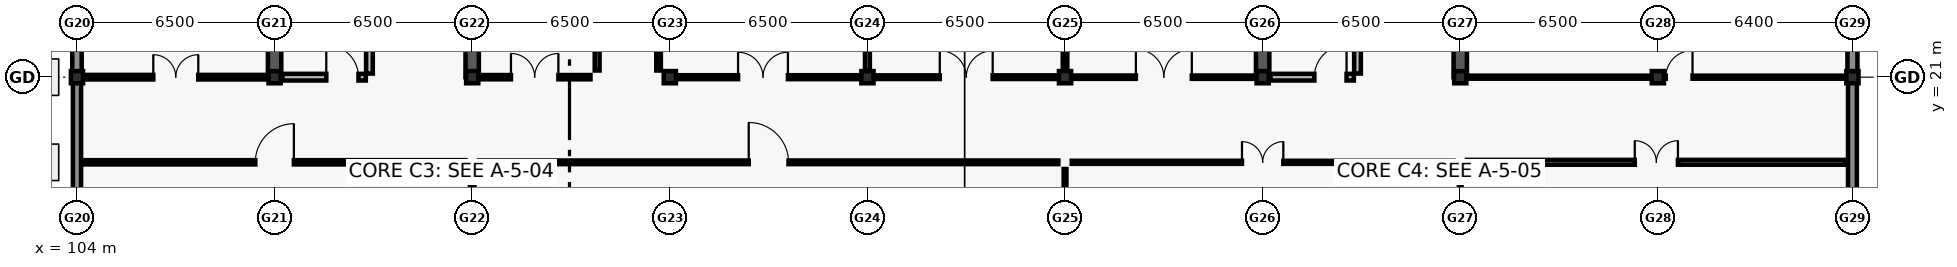
"""IFC4 building model, lengths in metres.
Left out: names, types, materials, properties, quantities, classifications, styles, units other than length and angle.
Written with IfcOpenShell. Run it as: python <this file> out.ifc"""

import sys

from ifc_helpers import new_model, si_unit, direction, frame, frame_2d, origin, origin_2d, place, context, subcontext, project, spatial, rectangle, i_section, extrude, element, fill, save


model = new_model("IFC4")
c1 = context("Model", 3, precision=1e-05, world=origin(), true_north=direction((0.0, 1.0)))
c2 = subcontext(c1, "Body", "Model", "MODEL_VIEW")
j1 = project(units=[si_unit("LENGTHUNIT", "METRE"), si_unit("PLANEANGLEUNIT", "RADIAN")], contexts=[c1])
p1 = place(None, origin())
s1 = spatial("IfcSite", under=j1, at=p1, CompositionType="ELEMENT")
p2 = place(p1, origin())
s2 = spatial("IfcBuilding", under=s1, at=p2, CompositionType="ELEMENT")
p3 = place(p2, origin())
s3 = spatial("IfcBuildingStorey", under=s2, at=p3, CompositionType="ELEMENT", Elevation=0.0)
for number, where, z_axis, x_axis in (
    (1, (104.0, 21.0, 0.0), (0.0, 0.0, 1.0), (1.0, 0.0, 0.0)),
    (2, (110.5, 21.0, 0.0), (0.0, 0.0, 1.0), (1.0, 0.0, 0.0)),
    (3, (117.0, 21.0, 0.0), (0.0, 0.0, 1.0), (1.0, 0.0, 0.0)),
    (4, (123.5, 21.0, 0.0), (0.0, 0.0, 1.0), (1.0, 0.0, 0.0)),
    (5, (130.0, 21.0, 0.0), (0.0, 0.0, 1.0), (1.0, 0.0, 0.0)),
    (6, (136.5, 21.0, 0.0), (0.0, 0.0, 1.0), (1.0, 0.0, 0.0)),
    (7, (143.0, 21.0, 0.0), (0.0, 0.0, 1.0), (1.0, 0.0, 0.0)),
    (8, (149.5, 21.0, 0.0), (0.0, 0.0, 1.0), (1.0, 0.0, 0.0)),
    (9, (156.0, 21.0, 0.0), (0.0, 0.0, 1.0), (1.0, 0.0, 0.0)),
    (10, (162.4, 21.0, 0.0), (0.0, 0.0, 1.0), (1.0, 0.0, 0.0)),
):
    element("IfcColumn", number, at=place(p3, frame(where, z_axis=z_axis, x_axis=x_axis)), inside=s3, PredefinedType="COLUMN", context=c2, shape_type="SweptSolid", body=[
        extrude(i_section(OverallWidth=0.4, OverallDepth=0.4, WebThickness=0.02, FlangeThickness=0.032, at=origin_2d()), origin(), (0.0, 0.0, 1.0), 5.4),
    ])
for number, where, z_axis, x_axis in (
    (11, (110.5, 21.0, 0.0), (0.0, 0.0, 1.0), (0.0, 1.0, 0.0)),
    (12, (117.0, 21.0, 0.0), (0.0, 0.0, 1.0), (0.0, 1.0, 0.0)),
    (13, (143.0, 21.0, 0.0), (0.0, 0.0, 1.0), (0.0, 1.0, 0.0)),
    (14, (149.5, 21.0, 0.0), (0.0, 0.0, 1.0), (0.0, 1.0, 0.0)),
):
    element("IfcWall", number, at=place(p3, frame(where, z_axis=z_axis, x_axis=x_axis)), inside=s3, PredefinedType="SHEAR", context=c2, shape_type="SweptSolid", body=[
        extrude(rectangle(XDim=6.38, YDim=0.44, at=frame_2d((3.19, 0.0))), origin(), (0.0, 0.0, 1.0), 5.16),
    ])
p4 = place(p3, frame((104.0, 14.405, 0.0), z_axis=(0.0, 0.0, 1.0), x_axis=(0.0, 1.0, 0.0)))
e15 = element("IfcWall", 15, at=p4, inside=s3, PredefinedType="SOLIDWALL", context=c2, shape_type="SweptSolid", body=[
    extrude(rectangle(XDim=6.59, YDim=0.27, at=frame_2d((3.295, 0.0))), origin(), (0.0, 0.0, 1.0), 4.52),
])
p5 = place(p4, frame((1.288, 0.0, 0.8)))
e16 = element("IfcOpeningElement", 16, at=p5, cuts=e15, PredefinedType="OPENING", context=c2, shape_type="SweptSolid", body=[
    extrude(rectangle(XDim=1.25, YDim=1.65, at=frame_2d((0.625, 0.825))), frame((0.0, 0.145, 0.0), z_axis=(0.0, -1.0, 0.0), x_axis=(1.0, 0.0, 0.0)), (0.0, 0.0, 1.0), 0.29),
])
p6 = place(p3, frame((162.4, 20.995, 0.0), z_axis=(0.0, 0.0, 1.0), x_axis=(0.0, -1.0, 0.0)))
e17 = element("IfcWall", 17, at=p6, inside=s3, PredefinedType="SOLIDWALL", context=c2, shape_type="SweptSolid", body=[
    extrude(rectangle(XDim=6.59, YDim=0.29, at=frame_2d((3.295, 0.0))), origin(), (0.0, 0.0, 1.0), 4.52),
])
p7 = place(p6, frame((3.978, 0.0, 0.8)))
e18 = element("IfcOpeningElement", 18, at=p7, cuts=e17, PredefinedType="OPENING", context=c2, shape_type="SweptSolid", body=[
    extrude(rectangle(XDim=1.4, YDim=1.65, at=frame_2d((0.7, 0.825))), frame((0.0, 0.155, 0.0), z_axis=(0.0, -1.0, 0.0), x_axis=(1.0, 0.0, 0.0)), (0.0, 0.0, 1.0), 0.31),
])
p8 = place(p3, frame((104.0, 21.005, 0.0), z_axis=(0.0, 0.0, 1.0), x_axis=(0.0, 1.0, 0.0)))
e19 = element("IfcWall", 19, at=p8, inside=s3, PredefinedType="SOLIDWALL", context=c2, shape_type="SweptSolid", body=[
    extrude(rectangle(XDim=6.59, YDim=0.31, at=frame_2d((3.295, 0.0))), origin(), (0.0, 0.0, 1.0), 4.52),
])
p9 = place(p8, frame((2.52, 0.0, 0.8)))
e20 = element("IfcOpeningElement", 20, at=p9, cuts=e19, PredefinedType="OPENING", context=c2, shape_type="SweptSolid", body=[
    extrude(rectangle(XDim=1.55, YDim=1.65, at=frame_2d((0.775, 0.825))), frame((0.0, 0.165, 0.0), z_axis=(0.0, -1.0, 0.0), x_axis=(1.0, 0.0, 0.0)), (0.0, 0.0, 1.0), 0.33),
])
p10 = place(p3, frame((162.4, 27.595, 0.0), z_axis=(0.0, 0.0, 1.0), x_axis=(0.0, -1.0, 0.0)))
e21 = element("IfcWall", 21, at=p10, inside=s3, PredefinedType="SOLIDWALL", context=c2, shape_type="SweptSolid", body=[
    extrude(rectangle(XDim=6.59, YDim=0.33, at=frame_2d((3.295, 0.0))), origin(), (0.0, 0.0, 1.0), 4.52),
])
p11 = place(p10, frame((2.37, 0.0, 0.8)))
e22 = element("IfcOpeningElement", 22, at=p11, cuts=e21, PredefinedType="OPENING", context=c2, shape_type="SweptSolid", body=[
    extrude(rectangle(XDim=1.85, YDim=1.55, at=frame_2d((0.925, 0.775))), frame((0.0, 0.175, 0.0), z_axis=(0.0, -1.0, 0.0), x_axis=(1.0, 0.0, 0.0)), (0.0, 0.0, 1.0), 0.35),
])
p12 = place(p3, frame((113.62, 21.12, 0.0), z_axis=(0.0, 0.0, 1.0), x_axis=(0.0, 1.0, 0.0)))
e23 = element("IfcWall", 23, at=p12, inside=s3, PredefinedType="SOLIDWALL", context=c2, shape_type="SweptSolid", body=[
    extrude(rectangle(XDim=6.255, YDim=0.22, at=frame_2d((3.127, 0.0))), origin(), (0.0, 0.0, 1.0), 5.16),
])
p13 = place(p3, frame((110.76, 21.0, 0.0), z_axis=(0.0, 0.0, 1.0), x_axis=(1.0, 0.0, 0.0)))
e24 = element("IfcWall", 24, at=p13, inside=s3, PredefinedType="SOLIDWALL", context=c2, shape_type="SweptSolid", body=[
    extrude(rectangle(XDim=2.74, YDim=0.22, at=frame_2d((1.37, 0.0))), origin(), (0.0, 0.0, 1.0), 4.52),
])
p14 = place(p13, frame((1.44, 0.0, 0.0)))
e25 = element("IfcOpeningElement", 25, at=p14, cuts=e24, PredefinedType="OPENING", context=c2, shape_type="SweptSolid", body=[
    extrude(rectangle(XDim=1.06, YDim=2.1, at=frame_2d((0.53, 1.05))), frame((0.0, 0.12, 0.0), z_axis=(0.0, -1.0, 0.0), x_axis=(1.0, 0.0, 0.0)), (0.0, 0.0, 1.0), 0.24),
])
p15 = place(p3, frame((146.12, 21.12, 0.0), z_axis=(0.0, 0.0, 1.0), x_axis=(0.0, 1.0, 0.0)))
e26 = element("IfcWall", 26, at=p15, inside=s3, PredefinedType="SOLIDWALL", context=c2, shape_type="SweptSolid", body=[
    extrude(rectangle(XDim=6.255, YDim=0.22, at=frame_2d((3.127, 0.0))), origin(), (0.0, 0.0, 1.0), 5.16),
])
p16 = place(p3, frame((143.26, 21.0, 0.0), z_axis=(0.0, 0.0, 1.0), x_axis=(1.0, 0.0, 0.0)))
e27 = element("IfcWall", 27, at=p16, inside=s3, PredefinedType="SOLIDWALL", context=c2, shape_type="SweptSolid", body=[
    extrude(rectangle(XDim=2.74, YDim=0.22, at=frame_2d((1.37, 0.0))), origin(), (0.0, 0.0, 1.0), 4.52),
])
p17 = place(p16, frame((1.44, 0.0, 0.0)))
e28 = element("IfcOpeningElement", 28, at=p17, cuts=e27, PredefinedType="OPENING", context=c2, shape_type="SweptSolid", body=[
    extrude(rectangle(XDim=1.06, YDim=2.1, at=frame_2d((0.53, 1.05))), frame((0.0, 0.12, 0.0), z_axis=(0.0, -1.0, 0.0), x_axis=(1.0, 0.0, 0.0)), (0.0, 0.0, 1.0), 0.24),
])
p18 = place(p3, frame((121.11, 21.22, 0.0), z_axis=(0.0, 0.0, 1.0), x_axis=(0.0, 1.0, 0.0)))
e29 = element("IfcWall", 29, at=p18, inside=s3, PredefinedType="PARTITIONING", context=c2, shape_type="SweptSolid", body=[
    extrude(rectangle(XDim=2.76, YDim=0.16, at=frame_2d((1.38, 0.0))), origin(), (0.0, 0.0, 1.0), 4.5),
])
p19 = place(p18, frame((0.94, 0.0, 0.0)))
e30 = element("IfcOpeningElement", 30, at=p19, cuts=e29, PredefinedType="OPENING", context=c2, shape_type="SweptSolid", body=[
    extrude(rectangle(XDim=0.88, YDim=2.04, at=frame_2d((0.44, 1.02))), frame((0.0, 0.09, 0.0), z_axis=(0.0, -1.0, 0.0), x_axis=(1.0, 0.0, 0.0)), (0.0, 0.0, 1.0), 0.18),
])
p20 = place(p3, frame((123.13, 21.22, 0.0), z_axis=(0.0, 0.0, 1.0), x_axis=(0.0, 1.0, 0.0)))
e31 = element("IfcWall", 31, at=p20, inside=s3, PredefinedType="PARTITIONING", context=c2, shape_type="SweptSolid", body=[
    extrude(rectangle(XDim=2.76, YDim=0.15, at=frame_2d((1.38, 0.0))), origin(), (0.0, 0.0, 1.0), 4.5),
])
p21 = place(p20, frame((0.925, 0.0, 0.0)))
e32 = element("IfcOpeningElement", 32, at=p21, cuts=e31, PredefinedType="OPENING", context=c2, shape_type="SweptSolid", body=[
    extrude(rectangle(XDim=0.91, YDim=2.06, at=frame_2d((0.455, 1.03))), frame((0.0, 0.085, 0.0), z_axis=(0.0, -1.0, 0.0), x_axis=(1.0, 0.0, 0.0)), (0.0, 0.0, 1.0), 0.17),
])
p22 = place(p3, frame((117.0, 8.02, 0.0), z_axis=(0.0, 0.0, 1.0), x_axis=(0.0, 1.0, 0.0)))
e33 = element("IfcWall", 33, at=p22, inside=s3, PredefinedType="PARTITIONING", context=c2, shape_type="SweptSolid", body=[
    extrude(rectangle(XDim=9.96, YDim=0.15, at=frame_2d((4.98, 0.0))), origin(), (0.0, 0.0, 1.0), 4.5),
])
p23 = place(p3, frame((104.22, 18.2, 0.0), z_axis=(0.0, 0.0, 1.0), x_axis=(1.0, 0.0, 0.0)))
e34 = element("IfcWall", 34, at=p23, inside=s3, PredefinedType="PARTITIONING", context=c2, shape_type="SweptSolid", body=[
    extrude(rectangle(XDim=12.56, YDim=0.14, at=frame_2d((6.28, 0.0))), origin(), (0.0, 0.0, 1.0), 4.5),
])
p24 = place(p23, frame((5.645, 0.0, 0.0)))
e35 = element("IfcOpeningElement", 35, at=p24, cuts=e34, PredefinedType="OPENING", context=c2, shape_type="SweptSolid", body=[
    extrude(rectangle(XDim=1.27, YDim=2.1, at=frame_2d((0.635, 1.05))), frame((0.0, 0.08, 0.0), z_axis=(0.0, -1.0, 0.0), x_axis=(1.0, 0.0, 0.0)), (0.0, 0.0, 1.0), 0.16),
])
p25 = place(p3, frame((136.5, 8.02, 0.0), z_axis=(0.0, 0.0, 1.0), x_axis=(0.0, 1.0, 0.0)))
e36 = element("IfcWall", 36, at=p25, inside=s3, PredefinedType="MOVABLE", context=c2, shape_type="SweptSolid", body=[
    extrude(rectangle(XDim=9.96, YDim=0.09, at=frame_2d((4.98, 0.0))), origin(), (0.0, 0.0, 1.0), 4.5),
])
p26 = place(p3, frame((117.22, 18.2, 0.0), z_axis=(0.0, 0.0, 1.0), x_axis=(1.0, 0.0, 0.0)))
e37 = element("IfcWall", 37, at=p26, inside=s3, PredefinedType="PARTITIONING", context=c2, shape_type="SweptSolid", body=[
    extrude(rectangle(XDim=19.06, YDim=0.12, at=frame_2d((9.53, 0.0))), origin(), (0.0, 0.0, 1.0), 4.5),
])
p27 = place(p26, frame((8.875, 0.0, 0.0)))
e38 = element("IfcOpeningElement", 38, at=p27, cuts=e37, PredefinedType="OPENING", context=c2, shape_type="SweptSolid", body=[
    extrude(rectangle(XDim=1.31, YDim=2.14, at=frame_2d((0.655, 1.07))), frame((0.0, 0.07, 0.0), z_axis=(0.0, -1.0, 0.0), x_axis=(1.0, 0.0, 0.0)), (0.0, 0.0, 1.0), 0.14),
])
p28 = place(p3, frame((149.5, 8.02, 0.0), z_axis=(0.0, 0.0, 1.0), x_axis=(0.0, 1.0, 0.0)))
e39 = element("IfcWall", 39, at=p28, inside=s3, PredefinedType="MOVABLE", context=c2, shape_type="SweptSolid", body=[
    extrude(rectangle(XDim=9.96, YDim=0.09, at=frame_2d((4.98, 0.0))), origin(), (0.0, 0.0, 1.0), 4.5),
])
p29 = place(p3, frame((136.72, 18.2, 0.0), z_axis=(0.0, 0.0, 1.0), x_axis=(1.0, 0.0, 0.0)))
e40 = element("IfcWall", 40, at=p29, inside=s3, PredefinedType="PARTITIONING", context=c2, shape_type="SweptSolid", body=[
    extrude(rectangle(XDim=12.56, YDim=0.1, at=frame_2d((6.28, 0.0))), origin(), (0.0, 0.0, 1.0), 4.5),
])
p30 = place(p29, frame((5.6, 0.0, 0.0)))
e41 = element("IfcOpeningElement", 41, at=p30, cuts=e40, PredefinedType="OPENING", context=c2, shape_type="SweptSolid", body=[
    extrude(rectangle(XDim=1.36, YDim=2.15, at=frame_2d((0.68, 1.075))), frame((0.0, 0.06, 0.0), z_axis=(0.0, -1.0, 0.0), x_axis=(1.0, 0.0, 0.0)), (0.0, 0.0, 1.0), 0.12),
])
p31 = place(p3, frame((149.72, 18.2, 0.0), z_axis=(0.0, 0.0, 1.0), x_axis=(1.0, 0.0, 0.0)))
e42 = element("IfcWall", 42, at=p31, inside=s3, PredefinedType="PARTITIONING", context=c2, shape_type="SweptSolid", body=[
    extrude(rectangle(XDim=12.46, YDim=0.16, at=frame_2d((6.23, 0.0))), origin(), (0.0, 0.0, 1.0), 4.5),
])
p32 = place(p31, frame((5.52, 0.0, 0.0)))
e43 = element("IfcOpeningElement", 43, at=p32, cuts=e42, PredefinedType="OPENING", context=c2, shape_type="SweptSolid", body=[
    extrude(rectangle(XDim=1.42, YDim=2.15, at=frame_2d((0.71, 1.075))), frame((0.0, 0.09, 0.0), z_axis=(0.0, -1.0, 0.0), x_axis=(1.0, 0.0, 0.0)), (0.0, 0.0, 1.0), 0.18),
])
p33 = place(p3, frame((104.22, 21.0, 0.0), z_axis=(0.0, 0.0, 1.0), x_axis=(1.0, 0.0, 0.0)))
e44 = element("IfcWall", 44, at=p33, inside=s3, PredefinedType="PARTITIONING", context=c2, shape_type="SweptSolid", body=[
    extrude(rectangle(XDim=6.06, YDim=0.15, at=frame_2d((3.03, 0.0))), origin(), (0.0, 0.0, 1.0), 4.5),
])
p34 = place(p33, frame((2.29, 0.0, 0.0)))
e45 = element("IfcOpeningElement", 45, at=p34, cuts=e44, PredefinedType="OPENING", context=c2, shape_type="SweptSolid", body=[
    extrude(rectangle(XDim=1.48, YDim=2.18, at=frame_2d((0.74, 1.09))), frame((0.0, 0.085, 0.0), z_axis=(0.0, -1.0, 0.0), x_axis=(1.0, 0.0, 0.0)), (0.0, 0.0, 1.0), 0.17),
])
p35 = place(p3, frame((117.22, 21.0, 0.0), z_axis=(0.0, 0.0, 1.0), x_axis=(1.0, 0.0, 0.0)))
e46 = element("IfcWall", 46, at=p35, inside=s3, PredefinedType="PARTITIONING", context=c2, shape_type="SweptSolid", body=[
    extrude(rectangle(XDim=3.67, YDim=0.14, at=frame_2d((1.835, 0.0))), origin(), (0.0, 0.0, 1.0), 4.5),
])
p36 = place(p35, frame((1.055, 0.0, 0.0)))
e47 = element("IfcOpeningElement", 47, at=p36, cuts=e46, PredefinedType="OPENING", context=c2, shape_type="SweptSolid", body=[
    extrude(rectangle(XDim=1.56, YDim=2.18, at=frame_2d((0.78, 1.09))), frame((0.0, 0.08, 0.0), z_axis=(0.0, -1.0, 0.0), x_axis=(1.0, 0.0, 0.0)), (0.0, 0.0, 1.0), 0.16),
])
p37 = place(p3, frame((123.35, 21.0, 0.0), z_axis=(0.0, 0.0, 1.0), x_axis=(1.0, 0.0, 0.0)))
e48 = element("IfcWall", 48, at=p37, inside=s3, PredefinedType="PARTITIONING", context=c2, shape_type="SweptSolid", body=[
    extrude(rectangle(XDim=6.43, YDim=0.13, at=frame_2d((3.215, 0.0))), origin(), (0.0, 0.0, 1.0), 4.5),
])
p38 = place(p37, frame((2.395, 0.0, 0.0)))
e49 = element("IfcOpeningElement", 49, at=p38, cuts=e48, PredefinedType="OPENING", context=c2, shape_type="SweptSolid", body=[
    extrude(rectangle(XDim=1.64, YDim=2.2, at=frame_2d((0.82, 1.1))), frame((0.0, 0.075, 0.0), z_axis=(0.0, -1.0, 0.0), x_axis=(1.0, 0.0, 0.0)), (0.0, 0.0, 1.0), 0.15),
])
p39 = place(p3, frame((130.22, 21.0, 0.0), z_axis=(0.0, 0.0, 1.0), x_axis=(1.0, 0.0, 0.0)))
e50 = element("IfcWall", 50, at=p39, inside=s3, PredefinedType="PARTITIONING", context=c2, shape_type="SweptSolid", body=[
    extrude(rectangle(XDim=6.06, YDim=0.12, at=frame_2d((3.03, 0.0))), origin(), (0.0, 0.0, 1.0), 4.5),
])
p40 = place(p39, frame((2.16, 0.0, 0.0)))
e51 = element("IfcOpeningElement", 51, at=p40, cuts=e50, PredefinedType="OPENING", context=c2, shape_type="SweptSolid", body=[
    extrude(rectangle(XDim=1.74, YDim=2.2, at=frame_2d((0.87, 1.1))), frame((0.0, 0.07, 0.0), z_axis=(0.0, -1.0, 0.0), x_axis=(1.0, 0.0, 0.0)), (0.0, 0.0, 1.0), 0.14),
])
p41 = place(p3, frame((136.72, 21.0, 0.0), z_axis=(0.0, 0.0, 1.0), x_axis=(1.0, 0.0, 0.0)))
e52 = element("IfcWall", 52, at=p41, inside=s3, PredefinedType="PARTITIONING", context=c2, shape_type="SweptSolid", body=[
    extrude(rectangle(XDim=6.06, YDim=0.11, at=frame_2d((3.03, 0.0))), origin(), (0.0, 0.0, 1.0), 4.5),
])
p42 = place(p41, frame((2.11, 0.0, 0.0)))
e53 = element("IfcOpeningElement", 53, at=p42, cuts=e52, PredefinedType="OPENING", context=c2, shape_type="SweptSolid", body=[
    extrude(rectangle(XDim=1.84, YDim=2.22, at=frame_2d((0.92, 1.11))), frame((0.0, 0.065, 0.0), z_axis=(0.0, -1.0, 0.0), x_axis=(1.0, 0.0, 0.0)), (0.0, 0.0, 1.0), 0.13),
])
p43 = place(p3, frame((149.72, 21.0, 0.0), z_axis=(0.0, 0.0, 1.0), x_axis=(1.0, 0.0, 0.0)))
e54 = element("IfcWall", 54, at=p43, inside=s3, PredefinedType="PARTITIONING", context=c2, shape_type="SweptSolid", body=[
    extrude(rectangle(XDim=12.46, YDim=0.1, at=frame_2d((6.23, 0.0))), origin(), (0.0, 0.0, 1.0), 4.5),
])
p44 = place(p43, frame((6.54, 0.0, 0.0)))
e55 = element("IfcOpeningElement", 55, at=p44, cuts=e54, PredefinedType="OPENING", context=c2, shape_type="SweptSolid", body=[
    extrude(rectangle(XDim=0.88, YDim=2.04, at=frame_2d((0.44, 1.02))), frame((0.0, 0.06, 0.0), z_axis=(0.0, -1.0, 0.0), x_axis=(1.0, 0.0, 0.0)), (0.0, 0.0, 1.0), 0.12),
])
p45 = place(p3, frame((130.0, 21.22, 0.0), z_axis=(0.0, 0.0, 1.0), x_axis=(0.0, 1.0, 0.0)))
e56 = element("IfcWall", 56, at=p45, inside=s3, PredefinedType="PARTITIONING", context=c2, shape_type="SweptSolid", body=[
    extrude(rectangle(XDim=6.16, YDim=0.16, at=frame_2d((3.08, 0.0))), origin(), (0.0, 0.0, 1.0), 4.5),
])
p46 = place(p3, frame((136.5, 21.22, 0.0), z_axis=(0.0, 0.0, 1.0), x_axis=(0.0, 1.0, 0.0)))
e57 = element("IfcWall", 57, at=p46, inside=s3, PredefinedType="PARTITIONING", context=c2, shape_type="SweptSolid", body=[
    extrude(rectangle(XDim=6.16, YDim=0.15, at=frame_2d((3.08, 0.0))), origin(), (0.0, 0.0, 1.0), 4.5),
])
p47 = place(p14, origin())
e58 = element("IfcDoor", 58, at=p47, inside=s3, OperationType="SINGLE_SWING_LEFT", PredefinedType="DOOR", context=c2, shape_type="SweptSolid", body=[
    extrude(rectangle(XDim=1.06, YDim=2.1, at=frame_2d((0.53, 1.05))), frame((0.0, 0.025, 0.0), z_axis=(0.0, -1.0, 0.0), x_axis=(1.0, 0.0, 0.0)), (0.0, 0.0, 1.0), 0.05),
])
fill(e25, e58)
p48 = place(p17, origin())
e59 = element("IfcDoor", 59, at=p48, inside=s3, OperationType="SINGLE_SWING_RIGHT", PredefinedType="DOOR", context=c2, shape_type="SweptSolid", body=[
    extrude(rectangle(XDim=1.06, YDim=2.1, at=frame_2d((0.53, 1.05))), frame((0.0, 0.025, 0.0), z_axis=(0.0, -1.0, 0.0), x_axis=(1.0, 0.0, 0.0)), (0.0, 0.0, 1.0), 0.05),
])
fill(e28, e59)
p49 = place(p24, origin())
e60 = element("IfcDoor", 60, at=p49, inside=s3, OperationType="SINGLE_SWING_RIGHT", PredefinedType="DOOR", context=c2, shape_type="SweptSolid", body=[
    extrude(rectangle(XDim=1.27, YDim=2.1, at=frame_2d((0.635, 1.05))), frame((0.0, 0.025, 0.0), z_axis=(0.0, -1.0, 0.0), x_axis=(1.0, 0.0, 0.0)), (0.0, 0.0, 1.0), 0.05),
])
fill(e35, e60)
p50 = place(p27, origin())
e61 = element("IfcDoor", 61, at=p50, inside=s3, OperationType="SINGLE_SWING_LEFT", PredefinedType="DOOR", context=c2, shape_type="SweptSolid", body=[
    extrude(rectangle(XDim=1.31, YDim=2.14, at=frame_2d((0.655, 1.07))), frame((0.0, 0.025, 0.0), z_axis=(0.0, -1.0, 0.0), x_axis=(1.0, 0.0, 0.0)), (0.0, 0.0, 1.0), 0.05),
])
fill(e38, e61)
p51 = place(p30, origin())
e62 = element("IfcDoor", 62, at=p51, inside=s3, OperationType="DOUBLE_DOOR_SINGLE_SWING", PredefinedType="DOOR", context=c2, shape_type="SweptSolid", body=[
    extrude(rectangle(XDim=1.36, YDim=2.15, at=frame_2d((0.68, 1.075))), frame((0.0, 0.025, 0.0), z_axis=(0.0, -1.0, 0.0), x_axis=(1.0, 0.0, 0.0)), (0.0, 0.0, 1.0), 0.05),
])
fill(e41, e62)
p52 = place(p32, origin())
e63 = element("IfcDoor", 63, at=p52, inside=s3, OperationType="DOUBLE_DOOR_SINGLE_SWING", PredefinedType="DOOR", context=c2, shape_type="SweptSolid", body=[
    extrude(rectangle(XDim=1.42, YDim=2.15, at=frame_2d((0.71, 1.075))), frame((0.0, 0.025, 0.0), z_axis=(0.0, -1.0, 0.0), x_axis=(1.0, 0.0, 0.0)), (0.0, 0.0, 1.0), 0.05),
])
fill(e43, e63)
p53 = place(p34, origin())
e64 = element("IfcDoor", 64, at=p53, inside=s3, OperationType="DOUBLE_DOOR_SINGLE_SWING", PredefinedType="DOOR", context=c2, shape_type="SweptSolid", body=[
    extrude(rectangle(XDim=1.48, YDim=2.18, at=frame_2d((0.74, 1.09))), frame((0.0, 0.025, 0.0), z_axis=(0.0, -1.0, 0.0), x_axis=(1.0, 0.0, 0.0)), (0.0, 0.0, 1.0), 0.05),
])
fill(e45, e64)
p54 = place(p36, origin())
e65 = element("IfcDoor", 65, at=p54, inside=s3, OperationType="DOUBLE_DOOR_SINGLE_SWING", PredefinedType="DOOR", context=c2, shape_type="SweptSolid", body=[
    extrude(rectangle(XDim=1.56, YDim=2.18, at=frame_2d((0.78, 1.09))), frame((0.0, 0.025, 0.0), z_axis=(0.0, -1.0, 0.0), x_axis=(1.0, 0.0, 0.0)), (0.0, 0.0, 1.0), 0.05),
])
fill(e47, e65)
p55 = place(p38, origin())
e66 = element("IfcDoor", 66, at=p55, inside=s3, OperationType="DOUBLE_DOOR_SINGLE_SWING", PredefinedType="DOOR", context=c2, shape_type="SweptSolid", body=[
    extrude(rectangle(XDim=1.64, YDim=2.2, at=frame_2d((0.82, 1.1))), frame((0.0, 0.025, 0.0), z_axis=(0.0, -1.0, 0.0), x_axis=(1.0, 0.0, 0.0)), (0.0, 0.0, 1.0), 0.05),
])
fill(e49, e66)
p56 = place(p40, origin())
e67 = element("IfcDoor", 67, at=p56, inside=s3, OperationType="DOUBLE_DOOR_SINGLE_SWING", PredefinedType="DOOR", context=c2, shape_type="SweptSolid", body=[
    extrude(rectangle(XDim=1.74, YDim=2.2, at=frame_2d((0.87, 1.1))), frame((0.0, 0.025, 0.0), z_axis=(0.0, -1.0, 0.0), x_axis=(1.0, 0.0, 0.0)), (0.0, 0.0, 1.0), 0.05),
])
fill(e51, e67)
p57 = place(p42, origin())
e68 = element("IfcDoor", 68, at=p57, inside=s3, OperationType="DOUBLE_DOOR_SINGLE_SWING", PredefinedType="DOOR", context=c2, shape_type="SweptSolid", body=[
    extrude(rectangle(XDim=1.84, YDim=2.22, at=frame_2d((0.92, 1.11))), frame((0.0, 0.025, 0.0), z_axis=(0.0, -1.0, 0.0), x_axis=(1.0, 0.0, 0.0)), (0.0, 0.0, 1.0), 0.05),
])
fill(e53, e68)
p58 = place(p44, origin())
e69 = element("IfcDoor", 69, at=p58, inside=s3, OperationType="SINGLE_SWING_RIGHT", PredefinedType="DOOR", context=c2, shape_type="SweptSolid", body=[
    extrude(rectangle(XDim=0.88, YDim=2.04, at=frame_2d((0.44, 1.02))), frame((0.0, 0.025, 0.0), z_axis=(0.0, -1.0, 0.0), x_axis=(1.0, 0.0, 0.0)), (0.0, 0.0, 1.0), 0.05),
])
fill(e55, e69)
save(model, sys.argv[1])
